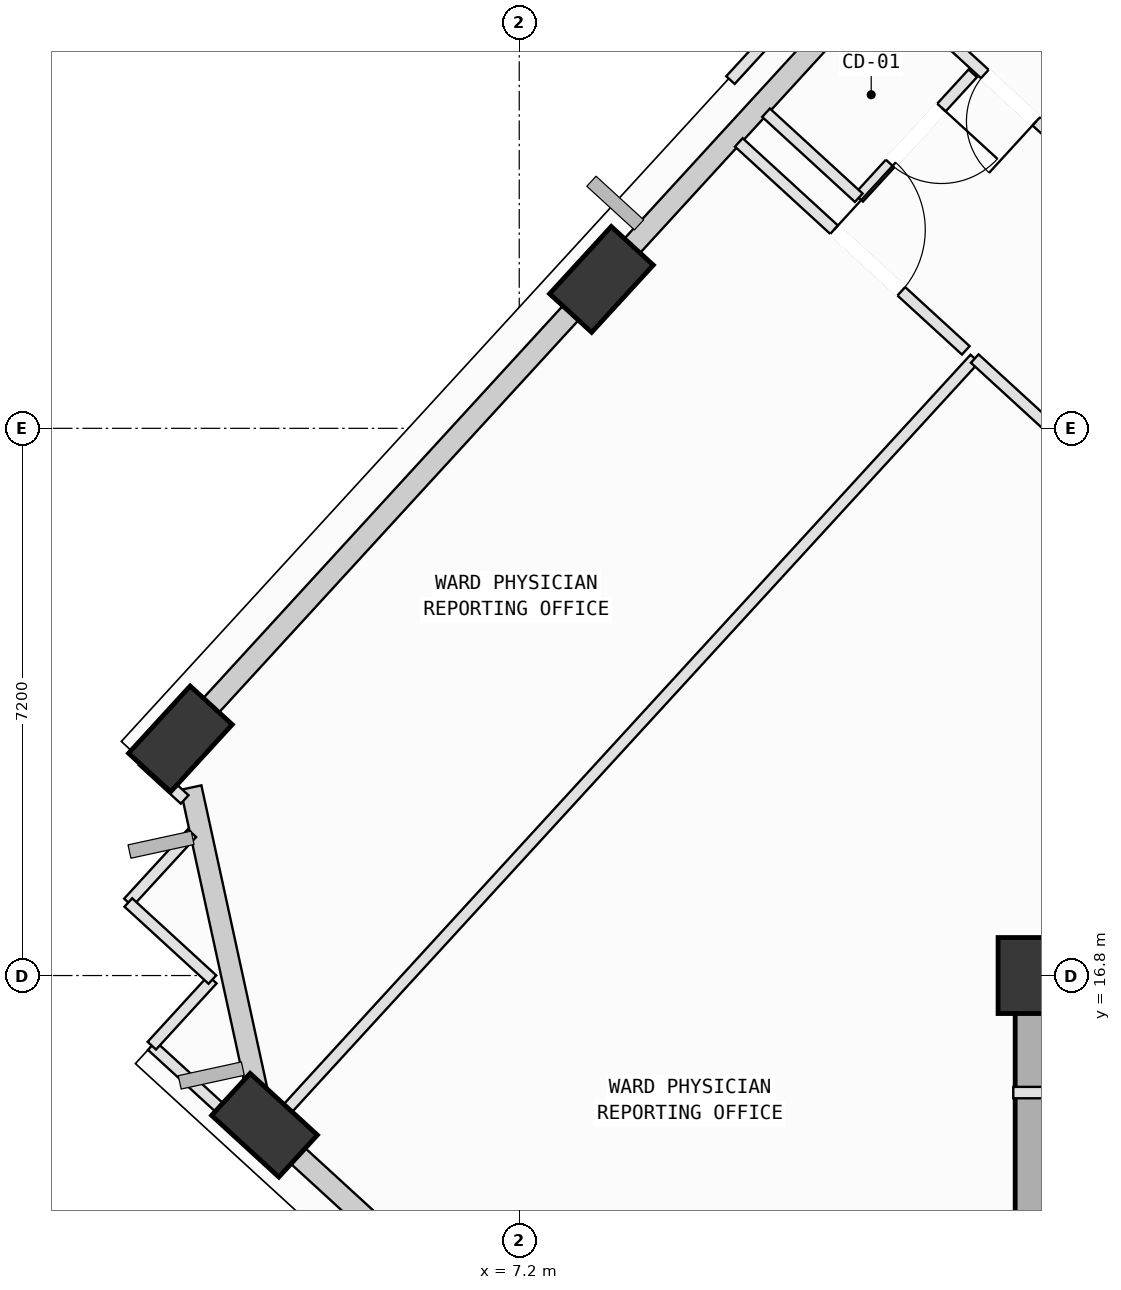
"""IFC4 building model, lengths in metres.
Left out: names, types, materials, properties, quantities, classifications, styles, units other than length and angle.
Written with IfcOpenShell. Run it as: python <this file> out.ifc"""

import sys

from ifc_helpers import new_model, si_unit, direction, frame, frame_2d, origin, origin_2d, place, context, subcontext, project, spatial, rectangle, extrude, element, fill, save


model = new_model("IFC4")
c1 = context("Model", 3, precision=1e-05, world=origin(), true_north=direction((0.0, 1.0)))
c2 = subcontext(c1, "Body", "Model", "MODEL_VIEW")
j1 = project(units=[si_unit("LENGTHUNIT", "METRE"), si_unit("PLANEANGLEUNIT", "RADIAN")], contexts=[c1])
p1 = place(None, origin())
s1 = spatial("IfcSite", under=j1, at=p1, CompositionType="ELEMENT")
p2 = place(p1, origin())
s2 = spatial("IfcBuilding", under=s1, at=p2, CompositionType="ELEMENT")
p3 = place(p2, frame((0.0, 0.0, 227.2)))
s3 = spatial("IfcBuildingStorey", under=s2, at=p3, CompositionType="ELEMENT", Elevation=227.2)
p4 = place(p3, frame((14.0, 16.8, 0.0), z_axis=(0.0, 0.0, 1.0), x_axis=(1.0, 0.0, 0.0)))
e1 = element("IfcColumn", 1, at=p4, inside=s3, PredefinedType="COLUMN", context=c2, shape_type="SweptSolid", body=[
    extrude(rectangle(XDim=1.0, YDim=1.0, at=origin_2d()), origin(), (0.0, 0.0, 1.0), 4.0),
])
p5 = place(p3, frame((8.281, 25.959, 0.002), z_axis=(-0.003888442193, -0.104380370131, 0.994529847892), x_axis=(0.702418254879, 0.707586004086, 0.07701066182)))
e2 = element("IfcColumn", 2, at=p5, inside=s3, PredefinedType="COLUMN", context=c2, shape_type="SweptSolid", body=[
    extrude(rectangle(XDim=1.2, YDim=0.75, at=origin_2d()), origin(), (0.0, 0.0, 1.0), 4.018),
])
p6 = place(p3, frame((2.742, 19.914, 0.002), z_axis=(0.021144206499, -0.12668348364, 0.991717811428), x_axis=(0.546000647433, 0.832416092269, 0.094692884292)))
e3 = element("IfcColumn", 3, at=p6, inside=s3, PredefinedType="COLUMN", context=c2, shape_type="SweptSolid", body=[
    extrude(rectangle(XDim=1.2, YDim=0.75, at=origin_2d()), origin(), (0.0, 0.0, 1.0), 4.03),
])
p7 = place(p3, frame((3.848, 14.831, 0.002), z_axis=(0.042043007584, -0.121948954273, 0.991645520368), x_axis=(-0.915374160326, 0.393059365616, 0.087146323554)))
e4 = element("IfcColumn", 4, at=p7, inside=s3, PredefinedType="COLUMN", context=c2, shape_type="SweptSolid", body=[
    extrude(rectangle(XDim=1.2, YDim=0.75, at=origin_2d()), origin(), (0.0, 0.0, 1.0), 4.03),
])
p8 = place(p3, frame((8.426, 26.117, 0.0), z_axis=(0.0, 0.0, 1.0), x_axis=(0.675580368307, 0.737286352754, 0.0)))
e5 = element("IfcWall", 5, at=p8, inside=s3, PredefinedType="SOLIDWALL", context=c2, shape_type="SweptSolid", body=[
    extrude(rectangle(XDim=7.434, YDim=0.28, at=frame_2d((3.717, 0.0))), origin(), (0.0, 0.0, 1.0), 3.265),
])
p9 = place(p3, frame((2.865, 20.048, 0.0), z_axis=(0.0, 0.0, 1.0), x_axis=(0.675593159299, 0.73727463208, 0.0)))
e6 = element("IfcWall", 6, at=p9, inside=s3, PredefinedType="SOLIDWALL", context=c2, shape_type="SweptSolid", body=[
    extrude(rectangle(XDim=7.485, YDim=0.28, at=frame_2d((3.742, 0.0))), origin(), (0.0, 0.0, 1.0), 3.265),
])
p10 = place(p3, frame((3.819, 14.966, 0.0), z_axis=(0.0, 0.0, 1.0), x_axis=(-0.212735453501, 0.977109833552, 0.0)))
e7 = element("IfcWall", 7, at=p10, inside=s3, PredefinedType="SOLIDWALL", context=c2, shape_type="SweptSolid", body=[
    extrude(rectangle(XDim=4.408, YDim=0.28, at=frame_2d((2.204, 0.0))), origin(), (0.0, 0.0, 1.0), 3.265),
])
p11 = place(p3, frame((8.594, 10.482, 0.0), z_axis=(0.0, 0.0, 1.0), x_axis=(-0.73727406181, 0.675593781634, 0.0)))
e8 = element("IfcWall", 8, at=p11, inside=s3, PredefinedType="SOLIDWALL", context=c2, shape_type="SweptSolid", body=[
    extrude(rectangle(XDim=5.83, YDim=0.28, at=frame_2d((2.915, 0.0))), origin(), (0.0, 0.0, 1.0), 3.265),
])
p12 = place(p11, frame((2.211, 0.0, 0.75)))
e9 = element("IfcOpeningElement", 9, at=p12, cuts=e8, PredefinedType="OPENING", context=c2, shape_type="SweptSolid", body=[
    extrude(rectangle(XDim=1.4, YDim=1.85, at=frame_2d((0.7, 0.925))), frame((0.0, 0.15, 0.0), z_axis=(0.0, -1.0, 0.0), x_axis=(1.0, 0.0, 0.0)), (0.0, 0.0, 1.0), 0.3),
])
p13 = place(p3, frame((14.0, 16.8, 0.0), z_axis=(0.0, 0.0, 1.0), x_axis=(0.0, -1.0, 0.0)))
e10 = element("IfcWall", 10, at=p13, inside=s3, PredefinedType="SHEAR", context=c2, shape_type="SweptSolid", body=[
    extrude(rectangle(XDim=9.0, YDim=0.55, at=frame_2d((4.5, 0.0))), origin(), (0.0, 0.0, 1.0), 3.78),
])
p14 = place(p3, frame((14.82, 15.26, 0.0), z_axis=(0.0, 0.0, 1.0), x_axis=(-1.0, 0.0, 0.0)))
e11 = element("IfcWall", 11, at=p14, inside=s3, PredefinedType="PARTITIONING", context=c2, shape_type="SweptSolid", body=[
    extrude(rectangle(XDim=1.12, YDim=0.15, at=frame_2d((0.56, 0.0))), origin(), (0.0, 0.0, 1.0), 3.78),
])
p15 = place(p3, frame((4.14, 14.251, 0.0), z_axis=(0.0, 0.0, 1.0), x_axis=(-0.737211336112, 0.675662227676, 0.0)))
e12 = element("IfcWall", 12, at=p15, inside=s3, PredefinedType="PARTITIONING", context=c2, shape_type="SweptSolid", body=[
    extrude(rectangle(XDim=0.531, YDim=0.15, at=frame_2d((0.266, 0.0))), origin(), (0.0, 0.0, 1.0), 3.265),
])
p16 = place(p3, frame((3.748, 14.61, 0.0), z_axis=(0.0, 0.0, 1.0), x_axis=(0.675576742694, 0.737289674911, 0.0)))
e13 = element("IfcWall", 13, at=p16, inside=s3, PredefinedType="PARTITIONING", context=c2, shape_type="SweptSolid", body=[
    extrude(rectangle(XDim=13.981, YDim=0.15, at=frame_2d((6.99, 0.0))), origin(), (0.0, 0.0, 1.0), 3.78),
])
p17 = place(p3, frame((13.193, 24.918, 0.0), z_axis=(0.0, 0.0, 1.0), x_axis=(0.737270925152, -0.675597204646, 0.0)))
e14 = element("IfcWall", 14, at=p17, inside=s3, PredefinedType="PARTITIONING", context=c2, shape_type="SweptSolid", body=[
    extrude(rectangle(XDim=6.421, YDim=0.15, at=frame_2d((3.21, 0.0))), origin(), (0.0, 0.0, 1.0), 3.78),
])
p18 = place(p17, frame((2.611, 0.0, 0.0)))
e15 = element("IfcOpeningElement", 15, at=p18, cuts=e14, PredefinedType="OPENING", context=c2, shape_type="SweptSolid", body=[
    extrude(rectangle(XDim=1.2, YDim=2.15, at=frame_2d((0.6, 1.075))), frame((0.0, 0.085, 0.0), z_axis=(0.0, -1.0, 0.0), x_axis=(1.0, 0.0, 0.0)), (0.0, 0.0, 1.0), 0.17),
])
p19 = place(p3, frame((2.057, 17.761, 0.0), z_axis=(0.0, 0.0, 1.0), x_axis=(0.676188837804, 0.736728345884, 0.0)))
e16 = element("IfcWall", 16, at=p19, inside=s3, PredefinedType="PARTITIONING", context=c2, shape_type="SweptSolid", body=[
    extrude(rectangle(XDim=1.238, YDim=0.15, at=frame_2d((0.619, 0.0))), origin(), (0.0, 0.0, 1.0), 3.78),
])
p20 = place(p3, frame((2.798, 19.117, 0.0), z_axis=(0.0, 0.0, 1.0), x_axis=(-0.737681160119, 0.675149247208, 0.0)))
e17 = element("IfcWall", 17, at=p20, inside=s3, PredefinedType="PARTITIONING", context=c2, shape_type="SweptSolid", body=[
    extrude(rectangle(XDim=0.75, YDim=0.15, at=frame_2d((0.375, 0.0))), origin(), (0.0, 0.0, 1.0), 3.78),
])
p21 = place(p3, frame((2.245, 19.623, 0.0), z_axis=(0.0, 0.0, 1.0), x_axis=(0.675543151001, 0.73732045349, 0.0)))
e18 = element("IfcWall", 18, at=p21, inside=s3, PredefinedType="PARTITIONING", context=c2, shape_type="SweptSolid", body=[
    extrude(rectangle(XDim=0.731, YDim=0.15, at=frame_2d((0.366, 0.0))), origin(), (0.0, 0.0, 1.0), 3.78),
])
p22 = place(p3, frame((7.796, 25.681, 0.0), z_axis=(0.0, 0.0, 1.0), x_axis=(0.675739417903, 0.737140582991, 0.0)))
e19 = element("IfcWall", 19, at=p22, inside=s3, PredefinedType="PARTITIONING", context=c2, shape_type="SweptSolid", body=[
    extrude(rectangle(XDim=0.748, YDim=0.15, at=frame_2d((0.374, 0.0))), origin(), (0.0, 0.0, 1.0), 3.78),
])
p23 = place(p3, frame((10.089, 27.762, 0.0), z_axis=(0.0, 0.0, 1.0), x_axis=(0.737269237185, -0.675599046699, 0.0)))
e20 = element("IfcWall", 20, at=p23, inside=s3, PredefinedType="PARTITIONING", context=c2, shape_type="SweptSolid", body=[
    extrude(rectangle(XDim=4.05, YDim=0.15, at=frame_2d((2.025, 0.0))), origin(), (0.0, 0.0, 1.0), 3.78),
])
p24 = place(p23, frame((1.7, 0.0, 0.0)))
e21 = element("IfcOpeningElement", 21, at=p24, cuts=e20, PredefinedType="OPENING", context=c2, shape_type="SweptSolid", body=[
    extrude(rectangle(XDim=1.2, YDim=2.15, at=frame_2d((0.6, 1.075))), frame((0.0, 0.085, 0.0), z_axis=(0.0, -1.0, 0.0), x_axis=(1.0, 0.0, 0.0)), (0.0, 0.0, 1.0), 0.17),
])
p25 = place(p3, frame((3.63, 14.719, 0.0), z_axis=(0.0, 0.0, 1.0), x_axis=(-0.737337385288, 0.675524670354, 0.0)))
e22 = element("IfcWall", 22, at=p25, inside=s3, PredefinedType="PARTITIONING", context=c2, shape_type="SweptSolid", body=[
    extrude(rectangle(XDim=1.714, YDim=0.15, at=frame_2d((0.857, 0.0))), origin(), (0.0, 0.0, 1.0), 3.78),
])
p26 = place(p3, frame((2.366, 15.877, 0.0), z_axis=(0.0, 0.0, 1.0), x_axis=(0.675499749295, 0.737360216382, 0.0)))
e23 = element("IfcWall", 23, at=p26, inside=s3, PredefinedType="PARTITIONING", context=c2, shape_type="SweptSolid", body=[
    extrude(rectangle(XDim=1.18, YDim=0.15, at=frame_2d((0.59, 0.0))), origin(), (0.0, 0.0, 1.0), 3.78),
])
p27 = place(p3, frame((3.163, 16.747, 0.0), z_axis=(0.0, 0.0, 1.0), x_axis=(-0.737187906939, 0.675687790227, 0.0)))
e24 = element("IfcWall", 24, at=p27, inside=s3, PredefinedType="PARTITIONING", context=c2, shape_type="SweptSolid", body=[
    extrude(rectangle(XDim=1.5, YDim=0.15, at=frame_2d((0.75, 0.0))), origin(), (0.0, 0.0, 1.0), 3.78),
])
p28 = place(p3, frame((15.314, 26.84, 0.0), z_axis=(0.0, 0.0, 1.0), x_axis=(-0.737287749663, 0.675578843805, 0.0)))
e25 = element("IfcWall", 25, at=p28, inside=s3, PredefinedType="PARTITIONING", context=c2, shape_type="SweptSolid", body=[
    extrude(rectangle(XDim=4.475, YDim=0.15, at=frame_2d((2.237, 0.0))), origin(), (0.0, 0.0, 1.0), 3.78),
])
p29 = place(p28, frame((1.777, 0.0, 0.0)))
e26 = element("IfcOpeningElement", 26, at=p29, cuts=e25, PredefinedType="OPENING", context=c2, shape_type="SweptSolid", body=[
    extrude(rectangle(XDim=0.92, YDim=2.1, at=frame_2d((0.46, 1.05))), frame((0.0, 0.085, 0.0), z_axis=(0.0, -1.0, 0.0), x_axis=(1.0, 0.0, 0.0)), (0.0, 0.0, 1.0), 0.17),
])
p30 = place(p3, frame((13.167, 28.671, 0.0), z_axis=(0.0, 0.0, 1.0), x_axis=(-0.675590176428, -0.737277365389, 0.0)))
e27 = element("IfcWall", 27, at=p30, inside=s3, PredefinedType="PARTITIONING", context=c2, shape_type="SweptSolid", body=[
    extrude(rectangle(XDim=2.22, YDim=0.15, at=frame_2d((1.11, 0.0))), origin(), (0.0, 0.0, 1.0), 3.78),
])
p31 = place(p30, frame((0.61, 0.0, 0.0)))
e28 = element("IfcOpeningElement", 28, at=p31, cuts=e27, PredefinedType="OPENING", context=c2, shape_type="SweptSolid", body=[
    extrude(rectangle(XDim=1.0, YDim=2.12, at=frame_2d((0.5, 1.06))), frame((0.0, 0.085, 0.0), z_axis=(0.0, -1.0, 0.0), x_axis=(1.0, 0.0, 0.0)), (0.0, 0.0, 1.0), 0.17),
])
p32 = place(p3, frame((11.667, 27.034, 0.0), z_axis=(0.0, 0.0, 1.0), x_axis=(-0.736903113635, 0.675998373604, 0.0)))
e29 = element("IfcWall", 29, at=p32, inside=s3, PredefinedType="PARTITIONING", context=c2, shape_type="SweptSolid", body=[
    extrude(rectangle(XDim=1.656, YDim=0.15, at=frame_2d((0.828, 0.0))), origin(), (0.0, 0.0, 1.0), 3.78),
])
p33 = place(p3, frame((9.979, 28.582, 0.0), z_axis=(0.0, 0.0, 1.0), x_axis=(0.675671981841, 0.737202396195, 0.0)))
e30 = element("IfcWall", 30, at=p33, inside=s3, PredefinedType="PARTITIONING", context=c2, shape_type="SweptSolid", body=[
    extrude(rectangle(XDim=5.67, YDim=0.15, at=frame_2d((2.835, 0.0))), origin(), (0.0, 0.0, 1.0), 3.78),
])
p34 = place(p24, origin())
e31 = element("IfcDoor", 31, at=p34, inside=s3, OperationType="SINGLE_SWING_LEFT", PredefinedType="DOOR", context=c2, shape_type="SweptSolid", body=[
    extrude(rectangle(XDim=1.2, YDim=2.15, at=frame_2d((0.6, 1.075))), frame((0.0, 0.025, 0.0), z_axis=(0.0, -1.0, 0.0), x_axis=(1.0, 0.0, 0.0)), (0.0, 0.0, 1.0), 0.05),
])
fill(e21, e31)
p35 = place(p29, origin())
e32 = element("IfcDoor", 32, at=p35, inside=s3, OperationType="SINGLE_SWING_LEFT", PredefinedType="DOOR", context=c2, shape_type="SweptSolid", body=[
    extrude(rectangle(XDim=0.92, YDim=2.1, at=frame_2d((0.46, 1.05))), frame((0.0, 0.025, 0.0), z_axis=(0.0, -1.0, 0.0), x_axis=(1.0, 0.0, 0.0)), (0.0, 0.0, 1.0), 0.05),
])
fill(e26, e32)
p36 = place(p31, origin())
e33 = element("IfcDoor", 33, at=p36, inside=s3, OperationType="SINGLE_SWING_LEFT", PredefinedType="DOOR", context=c2, shape_type="SweptSolid", body=[
    extrude(rectangle(XDim=1.0, YDim=2.12, at=frame_2d((0.5, 1.06))), frame((0.0, 0.025, 0.0), z_axis=(0.0, -1.0, 0.0), x_axis=(1.0, 0.0, 0.0)), (0.0, 0.0, 1.0), 0.05),
])
fill(e28, e33)
save(model, sys.argv[1])
